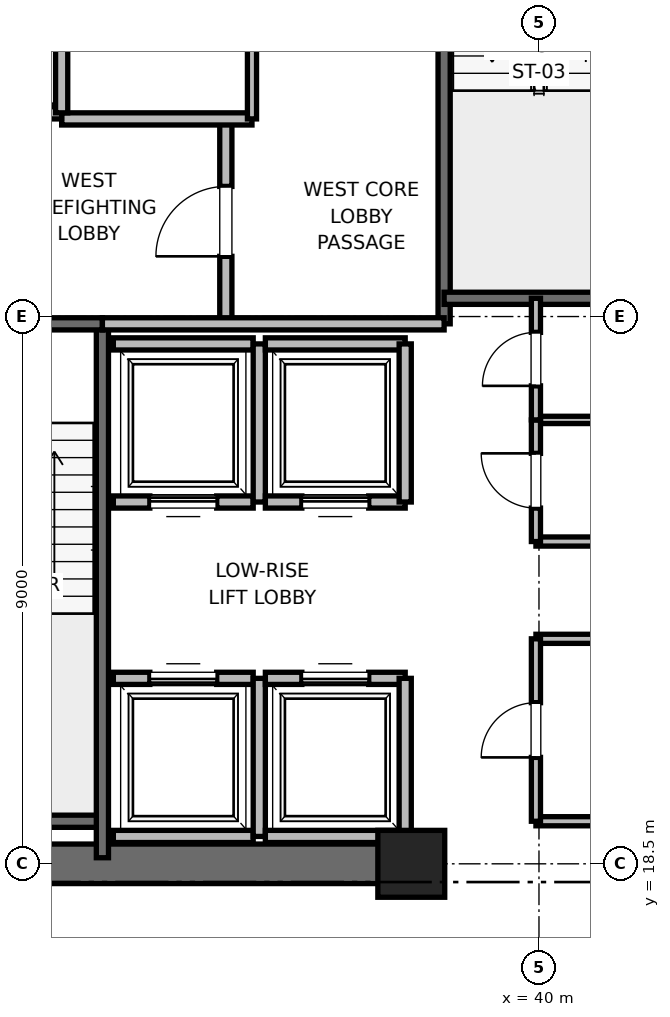
"""IFC4 building model, lengths in metres.
Left out: names, types, materials, properties, quantities, classifications, styles, units other than length and angle.
Written with IfcOpenShell. Run it as: python <this file> out.ifc"""

import sys

from ifc_helpers import new_model, si_unit, direction, frame, frame_2d, origin, origin_2d, place, context, subcontext, project, spatial, rectangle, extrude, element, fill, save


model = new_model("IFC4")
c1 = context("Model", 3, precision=1e-05, world=origin(), true_north=direction((0.0, 1.0)))
c2 = subcontext(c1, "Body", "Model", "MODEL_VIEW")
j1 = project(units=[si_unit("LENGTHUNIT", "METRE"), si_unit("PLANEANGLEUNIT", "RADIAN")], contexts=[c1])
p1 = place(None, origin())
s1 = spatial("IfcSite", under=j1, at=p1, CompositionType="ELEMENT")
p2 = place(p1, origin())
s2 = spatial("IfcBuilding", under=s1, at=p2, CompositionType="ELEMENT")
p3 = place(p2, frame((0.0, 0.0, 35.6)))
s3 = spatial("IfcBuildingStorey", under=s2, at=p3, CompositionType="ELEMENT", Elevation=35.6)
p4 = place(p3, frame((37.9, 18.5, 0.0), z_axis=(0.0, 0.0, 1.0), x_axis=(1.0, 0.0, 0.0)))
e1 = element("IfcColumn", 1, at=p4, inside=s3, PredefinedType="PILASTER", context=c2, shape_type="SweptSolid", body=[
    extrude(rectangle(XDim=1.1, YDim=1.1, at=origin_2d()), origin(), (0.0, 0.0, 1.0), 4.0),
])
p5 = place(p3, frame((29.0, 18.5, 0.0), z_axis=(0.0, 0.0, 1.0), x_axis=(1.0, 0.0, 0.0)))
e2 = element("IfcWall", 2, at=p5, inside=s3, PredefinedType="SHEAR", context=c2, shape_type="SweptSolid", body=[
    extrude(rectangle(XDim=9.2, YDim=0.65, at=frame_2d((4.6, 0.0))), origin(), (0.0, 0.0, 1.0), 3.76),
])
p6 = place(p3, frame((29.7, 19.2, 0.0), z_axis=(0.0, 0.0, 1.0), x_axis=(1.0, 0.0, 0.0)))
e3 = element("IfcWall", 3, at=p6, inside=s3, PredefinedType="SOLIDWALL", context=c2, shape_type="SweptSolid", body=[
    extrude(rectangle(XDim=3.12, YDim=0.2, at=frame_2d((1.56, 0.0))), origin(), (0.0, 0.0, 1.0), 3.76),
])
p7 = place(p3, frame((32.82, 18.6, 0.0), z_axis=(0.0, 0.0, 1.0), x_axis=(0.0, 1.0, 0.0)))
e4 = element("IfcWall", 4, at=p7, inside=s3, PredefinedType="SOLIDWALL", context=c2, shape_type="SweptSolid", body=[
    extrude(rectangle(XDim=8.78, YDim=0.2, at=frame_2d((4.39, 0.0))), origin(), (0.0, 0.0, 1.0), 3.76),
])
p8 = place(p3, frame((29.7, 27.38, 0.0), z_axis=(0.0, 0.0, 1.0), x_axis=(1.0, 0.0, 0.0)))
e5 = element("IfcWall", 5, at=p8, inside=s3, PredefinedType="SOLIDWALL", context=c2, shape_type="SweptSolid", body=[
    extrude(rectangle(XDim=3.12, YDim=0.2, at=frame_2d((1.56, 0.0))), origin(), (0.0, 0.0, 1.0), 3.76),
])
p9 = place(p8, frame((1.01, 0.0, 0.0)))
e6 = element("IfcOpeningElement", 6, at=p9, cuts=e5, PredefinedType="OPENING", context=c2, shape_type="SweptSolid", body=[
    extrude(rectangle(XDim=1.1, YDim=2.15, at=frame_2d((0.55, 1.075))), frame((0.0, 0.1, 0.0), z_axis=(0.0, -1.0, 0.0), x_axis=(1.0, 0.0, 0.0)), (0.0, 0.0, 1.0), 0.2),
])
p10 = place(p3, frame((38.44, 27.38, 0.0), z_axis=(0.0, 0.0, 1.0), x_axis=(0.0, 1.0, 0.0)))
e7 = element("IfcWall", 7, at=p10, inside=s3, PredefinedType="SOLIDWALL", context=c2, shape_type="SweptSolid", body=[
    extrude(rectangle(XDim=8.87, YDim=0.2, at=frame_2d((4.435, 0.0))), origin(), (0.0, 0.0, 1.0), 3.76),
])
p11 = place(p3, frame((38.44, 27.8, 0.0), z_axis=(0.0, 0.0, 1.0), x_axis=(1.0, 0.0, 0.0)))
e8 = element("IfcWall", 8, at=p11, inside=s3, PredefinedType="SOLIDWALL", context=c2, shape_type="SweptSolid", body=[
    extrude(rectangle(XDim=3.32, YDim=0.2, at=frame_2d((1.66, 0.0))), origin(), (0.0, 0.0, 1.0), 3.76),
])
p12 = place(p3, frame((34.85, 27.38, 0.0), z_axis=(0.0, 0.0, 1.0), x_axis=(0.0, 1.0, 0.0)))
e9 = element("IfcWall", 9, at=p12, inside=s3, PredefinedType="PARTITIONING", context=c2, shape_type="SweptSolid", body=[
    extrude(rectangle(XDim=3.37, YDim=0.2, at=frame_2d((1.685, 0.0))), origin(), (0.0, 0.0, 1.0), 3.76),
])
p13 = place(p12, frame((1.11, 0.0, 0.0)))
e10 = element("IfcOpeningElement", 10, at=p13, cuts=e9, PredefinedType="OPENING", context=c2, shape_type="SweptSolid", body=[
    extrude(rectangle(XDim=1.15, YDim=2.2, at=frame_2d((0.575, 1.1))), frame((0.0, 0.1, 0.0), z_axis=(0.0, -1.0, 0.0), x_axis=(1.0, 0.0, 0.0)), (0.0, 0.0, 1.0), 0.2),
])
p14 = place(p3, frame((32.82, 27.38, 0.0), z_axis=(0.0, 0.0, 1.0), x_axis=(1.0, 0.0, 0.0)))
e11 = element("IfcWall", 11, at=p14, inside=s3, PredefinedType="PARTITIONING", context=c2, shape_type="SweptSolid", body=[
    extrude(rectangle(XDim=5.62, YDim=0.2, at=frame_2d((2.81, 0.0))), origin(), (0.0, 0.0, 1.0), 3.76),
])
p15 = place(p3, frame((32.15, 30.75, 0.0), z_axis=(0.0, 0.0, 1.0), x_axis=(1.0, 0.0, 0.0)))
e12 = element("IfcWall", 12, at=p15, inside=s3, PredefinedType="PARTITIONING", context=c2, shape_type="SweptSolid", body=[
    extrude(rectangle(XDim=3.13, YDim=0.2, at=frame_2d((1.565, 0.0))), origin(), (0.0, 0.0, 1.0), 3.76),
])
p16 = place(p3, frame((29.55, 30.85, 0.0), z_axis=(0.0, 0.0, 1.0), x_axis=(1.0, 0.0, 0.0)))
e13 = element("IfcWall", 13, at=p16, inside=s3, PredefinedType="SOLIDWALL", context=c2, shape_type="SweptSolid", body=[
    extrude(rectangle(XDim=2.6, YDim=0.2, at=frame_2d((1.3, 0.0))), origin(), (0.0, 0.0, 1.0), 2.54),
])
p17 = place(p16, frame((0.75, 0.0, 0.0)))
e14 = element("IfcOpeningElement", 14, at=p17, cuts=e13, PredefinedType="OPENING", context=c2, shape_type="SweptSolid", body=[
    extrude(rectangle(XDim=1.1, YDim=2.2, at=frame_2d((0.55, 1.1))), frame((0.0, 0.1, 0.0), z_axis=(0.0, -1.0, 0.0), x_axis=(1.0, 0.0, 0.0)), (0.0, 0.0, 1.0), 0.2),
])
p18 = place(p3, frame((32.15, 30.85, 0.0), z_axis=(0.0, 0.0, 1.0), x_axis=(0.0, 1.0, 0.0)))
e15 = element("IfcWall", 15, at=p18, inside=s3, PredefinedType="SOLIDWALL", context=c2, shape_type="SweptSolid", body=[
    extrude(rectangle(XDim=3.0, YDim=0.2, at=frame_2d((1.5, 0.0))), origin(), (0.0, 0.0, 1.0), 3.76),
])
p19 = place(p3, frame((33.0, 18.95, 0.0), z_axis=(0.0, 0.0, 1.0), x_axis=(1.0, 0.0, 0.0)))
e16 = element("IfcWall", 16, at=p19, inside=s3, PredefinedType="SOLIDWALL", context=c2, shape_type="SweptSolid", body=[
    extrude(rectangle(XDim=2.3, YDim=0.2, at=frame_2d((1.15, 0.0))), origin(), (0.0, 0.0, 1.0), 3.76),
])
p20 = place(p3, frame((35.3, 21.55, 0.0), z_axis=(0.0, 0.0, 1.0), x_axis=(-1.0, 0.0, 0.0)))
e17 = element("IfcWall", 17, at=p20, inside=s3, PredefinedType="SOLIDWALL", context=c2, shape_type="SweptSolid", body=[
    extrude(rectangle(XDim=2.3, YDim=0.2, at=frame_2d((1.15, 0.0))), origin(), (0.0, 0.0, 1.0), 3.76),
])
p21 = place(p20, frame((0.6, 0.0, 0.0)))
e18 = element("IfcOpeningElement", 18, at=p21, cuts=e17, PredefinedType="OPENING", context=c2, shape_type="SweptSolid", body=[
    extrude(rectangle(XDim=1.1, YDim=2.2, at=frame_2d((0.55, 1.1))), frame((0.0, 0.1, 0.0), z_axis=(0.0, -1.0, 0.0), x_axis=(1.0, 0.0, 0.0)), (0.0, 0.0, 1.0), 0.2),
])
p22 = place(p3, frame((35.4, 18.95, 0.0), z_axis=(0.0, 0.0, 1.0), x_axis=(0.0, 1.0, 0.0)))
e19 = element("IfcWall", 19, at=p22, inside=s3, PredefinedType="SOLIDWALL", context=c2, shape_type="SweptSolid", body=[
    extrude(rectangle(XDim=2.6, YDim=0.2, at=frame_2d((1.3, 0.0))), origin(), (0.0, 0.0, 1.0), 3.76),
])
p23 = place(p3, frame((35.5, 18.95, 0.0), z_axis=(0.0, 0.0, 1.0), x_axis=(1.0, 0.0, 0.0)))
e20 = element("IfcWall", 20, at=p23, inside=s3, PredefinedType="SOLIDWALL", context=c2, shape_type="SweptSolid", body=[
    extrude(rectangle(XDim=2.3, YDim=0.2, at=frame_2d((1.15, 0.0))), origin(), (0.0, 0.0, 1.0), 2.54),
])
p24 = place(p3, frame((37.8, 21.55, 0.0), z_axis=(0.0, 0.0, 1.0), x_axis=(-1.0, 0.0, 0.0)))
e21 = element("IfcWall", 21, at=p24, inside=s3, PredefinedType="SOLIDWALL", context=c2, shape_type="SweptSolid", body=[
    extrude(rectangle(XDim=2.3, YDim=0.2, at=frame_2d((1.15, 0.0))), origin(), (0.0, 0.0, 1.0), 3.76),
])
p25 = place(p24, frame((0.6, 0.0, 0.0)))
e22 = element("IfcOpeningElement", 22, at=p25, cuts=e21, PredefinedType="OPENING", context=c2, shape_type="SweptSolid", body=[
    extrude(rectangle(XDim=1.1, YDim=2.2, at=frame_2d((0.55, 1.1))), frame((0.0, 0.1, 0.0), z_axis=(0.0, -1.0, 0.0), x_axis=(1.0, 0.0, 0.0)), (0.0, 0.0, 1.0), 0.2),
])
p26 = place(p3, frame((37.8, 18.95, 0.0), z_axis=(0.0, 0.0, 1.0), x_axis=(0.0, 1.0, 0.0)))
e23 = element("IfcWall", 23, at=p26, inside=s3, PredefinedType="SOLIDWALL", context=c2, shape_type="SweptSolid", body=[
    extrude(rectangle(XDim=2.6, YDim=0.2, at=frame_2d((1.3, 0.0))), origin(), (0.0, 0.0, 1.0), 2.54),
])
p27 = place(p3, frame((33.0, 24.45, 0.0), z_axis=(0.0, 0.0, 1.0), x_axis=(1.0, 0.0, 0.0)))
e24 = element("IfcWall", 24, at=p27, inside=s3, PredefinedType="SOLIDWALL", context=c2, shape_type="SweptSolid", body=[
    extrude(rectangle(XDim=2.3, YDim=0.2, at=frame_2d((1.15, 0.0))), origin(), (0.0, 0.0, 1.0), 3.76),
])
p28 = place(p27, frame((0.6, 0.0, 0.0)))
e25 = element("IfcOpeningElement", 25, at=p28, cuts=e24, PredefinedType="OPENING", context=c2, shape_type="SweptSolid", body=[
    extrude(rectangle(XDim=1.1, YDim=2.2, at=frame_2d((0.55, 1.1))), frame((0.0, 0.1, 0.0), z_axis=(0.0, -1.0, 0.0), x_axis=(1.0, 0.0, 0.0)), (0.0, 0.0, 1.0), 0.2),
])
p29 = place(p3, frame((35.3, 27.05, 0.0), z_axis=(0.0, 0.0, 1.0), x_axis=(-1.0, 0.0, 0.0)))
e26 = element("IfcWall", 26, at=p29, inside=s3, PredefinedType="SOLIDWALL", context=c2, shape_type="SweptSolid", body=[
    extrude(rectangle(XDim=2.3, YDim=0.2, at=frame_2d((1.15, 0.0))), origin(), (0.0, 0.0, 1.0), 3.76),
])
p30 = place(p3, frame((35.4, 24.45, 0.0), z_axis=(0.0, 0.0, 1.0), x_axis=(0.0, 1.0, 0.0)))
e27 = element("IfcWall", 27, at=p30, inside=s3, PredefinedType="SOLIDWALL", context=c2, shape_type="SweptSolid", body=[
    extrude(rectangle(XDim=2.6, YDim=0.2, at=frame_2d((1.3, 0.0))), origin(), (0.0, 0.0, 1.0), 3.76),
])
p31 = place(p3, frame((35.5, 24.45, 0.0), z_axis=(0.0, 0.0, 1.0), x_axis=(1.0, 0.0, 0.0)))
e28 = element("IfcWall", 28, at=p31, inside=s3, PredefinedType="SOLIDWALL", context=c2, shape_type="SweptSolid", body=[
    extrude(rectangle(XDim=2.3, YDim=0.2, at=frame_2d((1.15, 0.0))), origin(), (0.0, 0.0, 1.0), 3.76),
])
p32 = place(p31, frame((0.6, 0.0, 0.0)))
e29 = element("IfcOpeningElement", 29, at=p32, cuts=e28, PredefinedType="OPENING", context=c2, shape_type="SweptSolid", body=[
    extrude(rectangle(XDim=1.1, YDim=2.2, at=frame_2d((0.55, 1.1))), frame((0.0, 0.1, 0.0), z_axis=(0.0, -1.0, 0.0), x_axis=(1.0, 0.0, 0.0)), (0.0, 0.0, 1.0), 0.2),
])
p33 = place(p3, frame((37.8, 27.05, 0.0), z_axis=(0.0, 0.0, 1.0), x_axis=(-1.0, 0.0, 0.0)))
e30 = element("IfcWall", 30, at=p33, inside=s3, PredefinedType="SOLIDWALL", context=c2, shape_type="SweptSolid", body=[
    extrude(rectangle(XDim=2.3, YDim=0.2, at=frame_2d((1.15, 0.0))), origin(), (0.0, 0.0, 1.0), 3.76),
])
p34 = place(p3, frame((37.8, 24.45, 0.0), z_axis=(0.0, 0.0, 1.0), x_axis=(0.0, 1.0, 0.0)))
e31 = element("IfcWall", 31, at=p34, inside=s3, PredefinedType="SOLIDWALL", context=c2, shape_type="SweptSolid", body=[
    extrude(rectangle(XDim=2.6, YDim=0.2, at=frame_2d((1.3, 0.0))), origin(), (0.0, 0.0, 1.0), 3.76),
])
for number, where, z_axis, x_axis in (
    (32, (39.95, 19.2, 0.0), (0.0, 0.0, 1.0), (1.0, 0.0, 0.0)),
    (33, (39.95, 22.2, 0.0), (0.0, 0.0, 1.0), (1.0, 0.0, 0.0)),
    (34, (39.95, 23.8, 0.0), (0.0, 0.0, 1.0), (1.0, 0.0, 0.0)),
):
    element("IfcWall", number, at=place(p3, frame(where, z_axis=z_axis, x_axis=x_axis)), inside=s3, PredefinedType="PARTITIONING", context=c2, shape_type="SweptSolid", body=[
        extrude(rectangle(XDim=1.81, YDim=0.15, at=frame_2d((0.905, 0.0))), origin(), (0.0, 0.0, 1.0), 2.85),
    ])
p35 = place(p3, frame((39.95, 25.8, 0.0), z_axis=(0.0, 0.0, 1.0), x_axis=(1.0, 0.0, 0.0)))
e35 = element("IfcWall", 35, at=p35, inside=s3, PredefinedType="PARTITIONING", context=c2, shape_type="SweptSolid", body=[
    extrude(rectangle(XDim=1.81, YDim=0.12, at=frame_2d((0.905, 0.0))), origin(), (0.0, 0.0, 1.0), 2.85),
])
p36 = place(p3, frame((39.95, 19.2, 0.0), z_axis=(0.0, 0.0, 1.0), x_axis=(0.0, 1.0, 0.0)))
e36 = element("IfcWall", 36, at=p36, inside=s3, PredefinedType="PARTITIONING", context=c2, shape_type="SweptSolid", body=[
    extrude(rectangle(XDim=3.0, YDim=0.15, at=frame_2d((1.5, 0.0))), origin(), (0.0, 0.0, 1.0), 2.85),
])
p37 = place(p36, frame((1.05, 0.0, 0.0)))
e37 = element("IfcOpeningElement", 37, at=p37, cuts=e36, PredefinedType="OPENING", context=c2, shape_type="SweptSolid", body=[
    extrude(rectangle(XDim=0.9, YDim=2.1, at=frame_2d((0.45, 1.05))), frame((0.0, 0.075, 0.0), z_axis=(0.0, -1.0, 0.0), x_axis=(1.0, 0.0, 0.0)), (0.0, 0.0, 1.0), 0.15),
])
p38 = place(p3, frame((39.95, 23.8, 0.0), z_axis=(0.0, 0.0, 1.0), x_axis=(0.0, 1.0, 0.0)))
e38 = element("IfcWall", 38, at=p38, inside=s3, PredefinedType="PARTITIONING", context=c2, shape_type="SweptSolid", body=[
    extrude(rectangle(XDim=2.0, YDim=0.15, at=frame_2d((1.0, 0.0))), origin(), (0.0, 0.0, 1.0), 2.85),
])
p39 = place(p38, frame((0.55, 0.0, 0.0)))
e39 = element("IfcOpeningElement", 39, at=p39, cuts=e38, PredefinedType="OPENING", context=c2, shape_type="SweptSolid", body=[
    extrude(rectangle(XDim=0.9, YDim=2.1, at=frame_2d((0.45, 1.05))), frame((0.0, 0.075, 0.0), z_axis=(0.0, -1.0, 0.0), x_axis=(1.0, 0.0, 0.0)), (0.0, 0.0, 1.0), 0.15),
])
p40 = place(p3, frame((39.95, 25.8, 0.0), z_axis=(0.0, 0.0, 1.0), x_axis=(0.0, 1.0, 0.0)))
e40 = element("IfcWall", 40, at=p40, inside=s3, PredefinedType="PARTITIONING", context=c2, shape_type="SweptSolid", body=[
    extrude(rectangle(XDim=2.0, YDim=0.15, at=frame_2d((1.0, 0.0))), origin(), (0.0, 0.0, 1.0), 2.85),
])
p41 = place(p40, frame((0.56, 0.0, 0.0)))
e41 = element("IfcOpeningElement", 41, at=p41, cuts=e40, PredefinedType="OPENING", context=c2, shape_type="SweptSolid", body=[
    extrude(rectangle(XDim=0.88, YDim=2.1, at=frame_2d((0.44, 1.05))), frame((0.0, 0.075, 0.0), z_axis=(0.0, -1.0, 0.0), x_axis=(1.0, 0.0, 0.0)), (0.0, 0.0, 1.0), 0.15),
])
p42 = place(p3, frame((35.28, 30.75, 0.0), z_axis=(0.0, 0.0, 1.0), x_axis=(0.0, 1.0, 0.0)))
e42 = element("IfcWall", 42, at=p42, inside=s3, PredefinedType="PARTITIONING", context=c2, shape_type="SweptSolid", body=[
    extrude(rectangle(XDim=3.2, YDim=0.15, at=frame_2d((1.6, 0.0))), origin(), (0.0, 0.0, 1.0), 2.85),
])
p43 = place(p42, frame((1.15, 0.0, 0.0)))
e43 = element("IfcOpeningElement", 43, at=p43, cuts=e42, PredefinedType="OPENING", context=c2, shape_type="SweptSolid", body=[
    extrude(rectangle(XDim=0.9, YDim=2.1, at=frame_2d((0.45, 1.05))), frame((0.0, 0.075, 0.0), z_axis=(0.0, -1.0, 0.0), x_axis=(1.0, 0.0, 0.0)), (0.0, 0.0, 1.0), 0.15),
])
p44 = place(p13, origin())
e44 = element("IfcDoor", 44, at=p44, inside=s3, OperationType="SINGLE_SWING_LEFT", PredefinedType="DOOR", context=c2, shape_type="SweptSolid", body=[
    extrude(rectangle(XDim=1.15, YDim=2.2, at=frame_2d((0.575, 1.1))), frame((0.0, 0.025, 0.0), z_axis=(0.0, -1.0, 0.0), x_axis=(1.0, 0.0, 0.0)), (0.0, 0.0, 1.0), 0.05),
])
fill(e10, e44)
p45 = place(p21, origin())
e45 = element("IfcDoor", 45, at=p45, inside=s3, OperationType="SLIDING_TO_RIGHT", PredefinedType="DOOR", context=c2, shape_type="SweptSolid", body=[
    extrude(rectangle(XDim=1.1, YDim=2.2, at=frame_2d((0.55, 1.1))), frame((0.0, 0.025, 0.0), z_axis=(0.0, -1.0, 0.0), x_axis=(1.0, 0.0, 0.0)), (0.0, 0.0, 1.0), 0.05),
])
fill(e18, e45)
p46 = place(p25, origin())
e46 = element("IfcDoor", 46, at=p46, inside=s3, OperationType="SLIDING_TO_RIGHT", PredefinedType="DOOR", context=c2, shape_type="SweptSolid", body=[
    extrude(rectangle(XDim=1.1, YDim=2.2, at=frame_2d((0.55, 1.1))), frame((0.0, 0.025, 0.0), z_axis=(0.0, -1.0, 0.0), x_axis=(1.0, 0.0, 0.0)), (0.0, 0.0, 1.0), 0.05),
])
fill(e22, e46)
p47 = place(p28, origin())
e47 = element("IfcDoor", 47, at=p47, inside=s3, OperationType="SLIDING_TO_RIGHT", PredefinedType="DOOR", context=c2, shape_type="SweptSolid", body=[
    extrude(rectangle(XDim=1.1, YDim=2.2, at=frame_2d((0.55, 1.1))), frame((0.0, 0.025, 0.0), z_axis=(0.0, -1.0, 0.0), x_axis=(1.0, 0.0, 0.0)), (0.0, 0.0, 1.0), 0.05),
])
fill(e25, e47)
p48 = place(p32, origin())
e48 = element("IfcDoor", 48, at=p48, inside=s3, OperationType="SLIDING_TO_RIGHT", PredefinedType="DOOR", context=c2, shape_type="SweptSolid", body=[
    extrude(rectangle(XDim=1.1, YDim=2.2, at=frame_2d((0.55, 1.1))), frame((0.0, 0.025, 0.0), z_axis=(0.0, -1.0, 0.0), x_axis=(1.0, 0.0, 0.0)), (0.0, 0.0, 1.0), 0.05),
])
fill(e29, e48)
p49 = place(p37, origin())
e49 = element("IfcDoor", 49, at=p49, inside=s3, OperationType="SINGLE_SWING_LEFT", PredefinedType="DOOR", context=c2, shape_type="SweptSolid", body=[
    extrude(rectangle(XDim=0.9, YDim=2.1, at=frame_2d((0.45, 1.05))), frame((0.0, 0.025, 0.0), z_axis=(0.0, -1.0, 0.0), x_axis=(1.0, 0.0, 0.0)), (0.0, 0.0, 1.0), 0.05),
])
fill(e37, e49)
p50 = place(p39, origin())
e50 = element("IfcDoor", 50, at=p50, inside=s3, OperationType="SINGLE_SWING_RIGHT", PredefinedType="DOOR", context=c2, shape_type="SweptSolid", body=[
    extrude(rectangle(XDim=0.9, YDim=2.1, at=frame_2d((0.45, 1.05))), frame((0.0, 0.025, 0.0), z_axis=(0.0, -1.0, 0.0), x_axis=(1.0, 0.0, 0.0)), (0.0, 0.0, 1.0), 0.05),
])
fill(e39, e50)
p51 = place(p41, origin())
e51 = element("IfcDoor", 51, at=p51, inside=s3, OperationType="SINGLE_SWING_LEFT", PredefinedType="DOOR", context=c2, shape_type="SweptSolid", body=[
    extrude(rectangle(XDim=0.88, YDim=2.1, at=frame_2d((0.44, 1.05))), frame((0.0, 0.025, 0.0), z_axis=(0.0, -1.0, 0.0), x_axis=(1.0, 0.0, 0.0)), (0.0, 0.0, 1.0), 0.05),
])
fill(e41, e51)
save(model, sys.argv[1])
